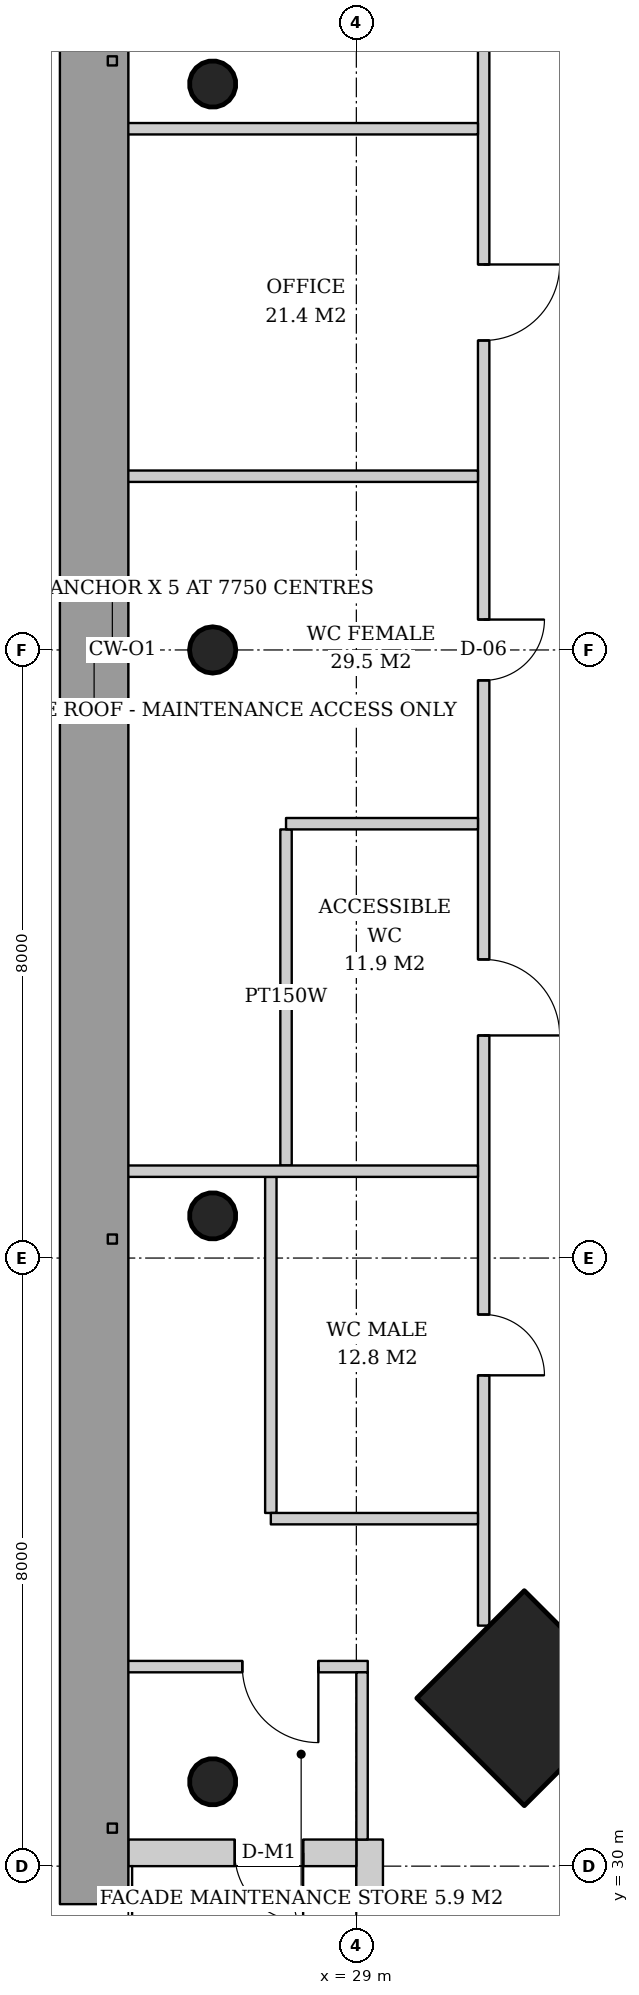
"""IFC4 building model, lengths in metres.
Left out: names, types, materials, properties, quantities, classifications, styles, units other than length and angle.
Written with IfcOpenShell. Run it as: python <this file> out.ifc"""

import sys

from ifc_helpers import new_model, si_unit, direction, frame, frame_2d, origin, origin_2d, place, context, subcontext, project, spatial, rectangle, hollow_circle, extrude, element, fill, save


model = new_model("IFC4")
c1 = context("Model", 3, precision=1e-05, world=origin(), true_north=direction((0.0, 1.0)))
c2 = subcontext(c1, "Body", "Model", "MODEL_VIEW")
j1 = project(units=[si_unit("LENGTHUNIT", "METRE"), si_unit("PLANEANGLEUNIT", "RADIAN")], contexts=[c1])
p1 = place(None, origin())
s1 = spatial("IfcSite", under=j1, at=p1, CompositionType="ELEMENT")
p2 = place(p1, origin())
s2 = spatial("IfcBuilding", under=s1, at=p2, CompositionType="ELEMENT")
p3 = place(p2, frame((0.0, 0.0, 211.0)))
s3 = spatial("IfcBuildingStorey", under=s2, at=p3, CompositionType="ELEMENT", Elevation=211.0)
p4 = place(p3, frame((31.171, 32.171, 0.0), z_axis=(0.031962158256, 0.031962158256, 0.998977898093), x_axis=(-0.707106781187, 0.707106781187, 0.0)))
e1 = element("IfcColumn", 1, at=p4, inside=s3, PredefinedType="COLUMN", context=c2, shape_type="SweptSolid", body=[
    extrude(rectangle(XDim=2.0, YDim=2.0, at=origin_2d()), origin(), (0.0, 0.0, 1.0), 3.804),
])
p5 = place(p3, frame((27.072, 31.072, 0.0), z_axis=(0.031898107953, 0.031898107953, 0.998981992539), x_axis=(-0.707106781187, 0.707106781187, 0.0)))
e2 = element("IfcColumn", 2, at=p5, inside=s3, PredefinedType="COLUMN", context=c2, shape_type="SweptSolid", body=[
    extrude(hollow_circle(Radius=0.305, WallThickness=0.025, at=origin_2d()), origin(), (0.0, 0.0, 1.0), 3.804),
])
p6 = place(p3, frame((27.072, 53.464, 0.0), z_axis=(0.031910269556, -0.015987237665, 0.999362868496), x_axis=(0.447933021895, 0.894067115991, 0.0)))
e3 = element("IfcColumn", 3, at=p6, inside=s3, PredefinedType="COLUMN", context=c2, shape_type="SweptSolid", body=[
    extrude(hollow_circle(Radius=0.305, WallThickness=0.025, at=origin_2d()), origin(), (0.0, 0.0, 1.0), 3.802),
])
p7 = place(p3, frame((27.072, 46.0, 0.0), z_axis=(0.031914348339, 0.0, 0.999490607445), x_axis=(0.0, 1.0, 0.0)))
e4 = element("IfcColumn", 4, at=p7, inside=s3, PredefinedType="COLUMN", context=c2, shape_type="SweptSolid", body=[
    extrude(hollow_circle(Radius=0.305, WallThickness=0.025, at=origin_2d()), origin(), (0.0, 0.0, 1.0), 3.802),
])
p8 = place(p3, frame((27.072, 38.536, 0.0), z_axis=(0.031910269556, 0.015987237665, 0.999362868496), x_axis=(-0.447933021895, 0.894067115991, 0.0)))
e5 = element("IfcColumn", 5, at=p8, inside=s3, PredefinedType="COLUMN", context=c2, shape_type="SweptSolid", body=[
    extrude(hollow_circle(Radius=0.305, WallThickness=0.025, at=origin_2d()), origin(), (0.0, 0.0, 1.0), 3.802),
])
p9 = place(p3, frame((29.175, 27.0, 0.0), z_axis=(0.0, 0.0, 1.0), x_axis=(0.0, 1.0, 0.0)))
e6 = element("IfcWall", 6, at=p9, inside=s3, PredefinedType="SOLIDWALL", context=c2, shape_type="SweptSolid", body=[
    extrude(rectangle(XDim=3.35, YDim=0.35, at=frame_2d((1.675, 0.0))), origin(), (0.0, 0.0, 1.0), 3.62),
])
p10 = place(p9, frame((1.6, 0.0, 0.0)))
e7 = element("IfcOpeningElement", 7, at=p10, cuts=e6, PredefinedType="OPENING", context=c2, shape_type="SweptSolid", body=[
    extrude(rectangle(XDim=1.0, YDim=2.4, at=frame_2d((0.5, 1.2))), frame((0.0, 0.185, 0.0), z_axis=(0.0, -1.0, 0.0), x_axis=(1.0, 0.0, 0.0)), (0.0, 0.0, 1.0), 0.37),
])
p11 = place(p3, frame((29.0, 30.175, 0.0), z_axis=(0.0, 0.0, 1.0), x_axis=(-1.0, 0.0, 0.0)))
e8 = element("IfcWall", 8, at=p11, inside=s3, PredefinedType="SOLIDWALL", context=c2, shape_type="SweptSolid", body=[
    extrude(rectangle(XDim=3.0, YDim=0.35, at=frame_2d((1.5, 0.0))), origin(), (0.0, 0.0, 1.0), 3.62),
])
p12 = place(p11, frame((0.7, 0.0, 0.0)))
e9 = element("IfcOpeningElement", 9, at=p12, cuts=e8, PredefinedType="OPENING", context=c2, shape_type="SweptSolid", body=[
    extrude(rectangle(XDim=0.9, YDim=2.1, at=frame_2d((0.45, 1.05))), frame((0.0, 0.185, 0.0), z_axis=(0.0, -1.0, 0.0), x_axis=(1.0, 0.0, 0.0)), (0.0, 0.0, 1.0), 0.37),
])
p13 = place(p3, frame((28.075, 43.639, 0.0), z_axis=(0.0, 0.0, 1.0), x_axis=(0.0, -1.0, 0.0)))
e10 = element("IfcWall", 10, at=p13, inside=s3, PredefinedType="PARTITIONING", context=c2, shape_type="SweptSolid", body=[
    extrude(rectangle(XDim=4.422, YDim=0.15, at=frame_2d((2.211, 0.0))), origin(), (0.0, 0.0, 1.0), 2.867),
])
p14 = place(p3, frame((27.875, 39.068, 0.0), z_axis=(0.0, 0.0, 1.0), x_axis=(0.0, -1.0, 0.0)))
e11 = element("IfcWall", 11, at=p14, inside=s3, PredefinedType="PARTITIONING", context=c2, shape_type="SweptSolid", body=[
    extrude(rectangle(XDim=4.421, YDim=0.15, at=frame_2d((2.211, 0.0))), origin(), (0.0, 0.0, 1.0), 2.867),
])
p15 = place(p3, frame((30.675, 58.836, 0.0), z_axis=(0.0, 0.0, 1.0), x_axis=(0.0, -1.0, 0.0)))
e12 = element("IfcWall", 12, at=p15, inside=s3, PredefinedType="PARTITIONING", context=c2, shape_type="SweptSolid", body=[
    extrude(rectangle(XDim=25.671, YDim=0.15, at=frame_2d((12.836, 0.0))), origin(), (0.0, 0.0, 1.0), 2.867),
])
p16 = place(p15, frame((3.193, 0.0, 0.0)))
e13 = element("IfcOpeningElement", 13, at=p16, cuts=e12, PredefinedType="OPENING", context=c2, shape_type="SweptSolid", body=[
    extrude(rectangle(XDim=1.0, YDim=2.1, at=frame_2d((0.5, 1.05))), frame((0.0, 0.085, 0.0), z_axis=(0.0, -1.0, 0.0), x_axis=(1.0, 0.0, 0.0)), (0.0, 0.0, 1.0), 0.17),
])
p17 = place(p15, frame((7.764, 0.0, 0.0)))
e14 = element("IfcOpeningElement", 14, at=p17, cuts=e12, PredefinedType="OPENING", context=c2, shape_type="SweptSolid", body=[
    extrude(rectangle(XDim=1.0, YDim=2.1, at=frame_2d((0.5, 1.05))), frame((0.0, 0.085, 0.0), z_axis=(0.0, -1.0, 0.0), x_axis=(1.0, 0.0, 0.0)), (0.0, 0.0, 1.0), 0.17),
])
p18 = place(p15, frame((12.436, 0.0, 0.0)))
e15 = element("IfcOpeningElement", 15, at=p18, cuts=e12, PredefinedType="OPENING", context=c2, shape_type="SweptSolid", body=[
    extrude(rectangle(XDim=0.8, YDim=2.1, at=frame_2d((0.4, 1.05))), frame((0.0, 0.085, 0.0), z_axis=(0.0, -1.0, 0.0), x_axis=(1.0, 0.0, 0.0)), (0.0, 0.0, 1.0), 0.17),
])
p19 = place(p15, frame((16.907, 0.0, 0.0)))
e16 = element("IfcOpeningElement", 16, at=p19, cuts=e12, PredefinedType="OPENING", context=c2, shape_type="SweptSolid", body=[
    extrude(rectangle(XDim=1.0, YDim=2.1, at=frame_2d((0.5, 1.05))), frame((0.0, 0.085, 0.0), z_axis=(0.0, -1.0, 0.0), x_axis=(1.0, 0.0, 0.0)), (0.0, 0.0, 1.0), 0.17),
])
p20 = place(p15, frame((21.579, 0.0, 0.0)))
e17 = element("IfcOpeningElement", 17, at=p20, cuts=e12, PredefinedType="OPENING", context=c2, shape_type="SweptSolid", body=[
    extrude(rectangle(XDim=0.8, YDim=2.1, at=frame_2d((0.4, 1.05))), frame((0.0, 0.085, 0.0), z_axis=(0.0, -1.0, 0.0), x_axis=(1.0, 0.0, 0.0)), (0.0, 0.0, 1.0), 0.17),
])
for number, where, z_axis, x_axis in (
    (18, (30.6, 52.857, 0.0), (0.0, 0.0, 1.0), (-1.0, 0.0, 0.0)),
    (19, (30.6, 48.286, 0.0), (0.0, 0.0, 1.0), (-1.0, 0.0, 0.0)),
):
    element("IfcWall", number, at=place(p3, frame(where, z_axis=z_axis, x_axis=x_axis)), inside=s3, PredefinedType="PARTITIONING", context=c2, shape_type="SweptSolid", body=[
        extrude(rectangle(XDim=4.64, YDim=0.15, at=frame_2d((2.32, 0.0))), origin(), (0.0, 0.0, 1.0), 3.12),
    ])
p21 = place(p3, frame((30.6, 43.714, 0.0), z_axis=(0.0, 0.0, 1.0), x_axis=(-1.0, 0.0, 0.0)))
e20 = element("IfcWall", 20, at=p21, inside=s3, PredefinedType="PARTITIONING", context=c2, shape_type="SweptSolid", body=[
    extrude(rectangle(XDim=2.525, YDim=0.15, at=frame_2d((1.263, 0.0))), origin(), (0.0, 0.0, 1.0), 2.867),
])
p22 = place(p3, frame((30.6, 39.143, 0.0), z_axis=(0.0, 0.0, 1.0), x_axis=(-1.0, 0.0, 0.0)))
e21 = element("IfcWall", 21, at=p22, inside=s3, PredefinedType="PARTITIONING", context=c2, shape_type="SweptSolid", body=[
    extrude(rectangle(XDim=4.64, YDim=0.15, at=frame_2d((2.32, 0.0))), origin(), (0.0, 0.0, 1.0), 3.12),
])
p23 = place(p3, frame((30.6, 34.572, 0.0), z_axis=(0.0, 0.0, 1.0), x_axis=(-1.0, 0.0, 0.0)))
e22 = element("IfcWall", 22, at=p23, inside=s3, PredefinedType="PARTITIONING", context=c2, shape_type="SweptSolid", body=[
    extrude(rectangle(XDim=2.725, YDim=0.15, at=frame_2d((1.363, 0.0))), origin(), (0.0, 0.0, 1.0), 3.62),
])
p24 = place(p3, frame((29.15, 32.625, 0.0), z_axis=(0.0, 0.0, 1.0), x_axis=(-1.0, 0.0, 0.0)))
e23 = element("IfcWall", 23, at=p24, inside=s3, PredefinedType="PARTITIONING", context=c2, shape_type="SweptSolid", body=[
    extrude(rectangle(XDim=3.19, YDim=0.15, at=frame_2d((1.595, 0.0))), origin(), (0.0, 0.0, 1.0), 3.12),
])
p25 = place(p24, frame((0.65, 0.0, 0.0)))
e24 = element("IfcOpeningElement", 24, at=p25, cuts=e23, PredefinedType="OPENING", context=c2, shape_type="SweptSolid", body=[
    extrude(rectangle(XDim=1.0, YDim=2.1, at=frame_2d((0.5, 1.05))), frame((0.0, 0.085, 0.0), z_axis=(0.0, -1.0, 0.0), x_axis=(1.0, 0.0, 0.0)), (0.0, 0.0, 1.0), 0.17),
])
p26 = place(p3, frame((29.075, 32.55, 0.0), z_axis=(0.0, 0.0, 1.0), x_axis=(0.0, -1.0, 0.0)))
e25 = element("IfcWall", 25, at=p26, inside=s3, PredefinedType="PARTITIONING", context=c2, shape_type="SweptSolid", body=[
    extrude(rectangle(XDim=2.2, YDim=0.15, at=frame_2d((1.1, 0.0))), origin(), (0.0, 0.0, 1.0), 3.02),
])
p27 = place(p12, origin())
e26 = element("IfcDoor", 26, at=p27, inside=s3, OperationType="SINGLE_SWING_LEFT", PredefinedType="DOOR", context=c2, shape_type="SweptSolid", body=[
    extrude(rectangle(XDim=0.9, YDim=2.1, at=frame_2d((0.45, 1.05))), frame((0.0, 0.025, 0.0), z_axis=(0.0, -1.0, 0.0), x_axis=(1.0, 0.0, 0.0)), (0.0, 0.0, 1.0), 0.05),
])
fill(e9, e26)
p28 = place(p10, origin())
e27 = element("IfcDoor", 27, at=p28, inside=s3, OperationType="SINGLE_SWING_RIGHT", PredefinedType="DOOR", context=c2, shape_type="SweptSolid", body=[
    extrude(rectangle(XDim=1.0, YDim=2.4, at=frame_2d((0.5, 1.2))), frame((0.0, 0.025, 0.0), z_axis=(0.0, -1.0, 0.0), x_axis=(1.0, 0.0, 0.0)), (0.0, 0.0, 1.0), 0.05),
])
fill(e7, e27)
p29 = place(p17, origin())
e28 = element("IfcDoor", 28, at=p29, inside=s3, OperationType="SINGLE_SWING_LEFT", PredefinedType="DOOR", context=c2, shape_type="SweptSolid", body=[
    extrude(rectangle(XDim=1.0, YDim=2.1, at=frame_2d((0.5, 1.05))), frame((0.0, 0.025, 0.0), z_axis=(0.0, -1.0, 0.0), x_axis=(1.0, 0.0, 0.0)), (0.0, 0.0, 1.0), 0.05),
])
fill(e14, e28)
p30 = place(p18, origin())
e29 = element("IfcDoor", 29, at=p30, inside=s3, OperationType="SINGLE_SWING_LEFT", PredefinedType="DOOR", context=c2, shape_type="SweptSolid", body=[
    extrude(rectangle(XDim=0.8, YDim=2.1, at=frame_2d((0.4, 1.05))), frame((0.0, 0.025, 0.0), z_axis=(0.0, -1.0, 0.0), x_axis=(1.0, 0.0, 0.0)), (0.0, 0.0, 1.0), 0.05),
])
fill(e15, e29)
p31 = place(p19, origin())
e30 = element("IfcDoor", 30, at=p31, inside=s3, OperationType="SINGLE_SWING_RIGHT", PredefinedType="DOOR", context=c2, shape_type="SweptSolid", body=[
    extrude(rectangle(XDim=1.0, YDim=2.1, at=frame_2d((0.5, 1.05))), frame((0.0, 0.025, 0.0), z_axis=(0.0, -1.0, 0.0), x_axis=(1.0, 0.0, 0.0)), (0.0, 0.0, 1.0), 0.05),
])
fill(e16, e30)
p32 = place(p20, origin())
e31 = element("IfcDoor", 31, at=p32, inside=s3, OperationType="SINGLE_SWING_RIGHT", PredefinedType="DOOR", context=c2, shape_type="SweptSolid", body=[
    extrude(rectangle(XDim=0.8, YDim=2.1, at=frame_2d((0.4, 1.05))), frame((0.0, 0.025, 0.0), z_axis=(0.0, -1.0, 0.0), x_axis=(1.0, 0.0, 0.0)), (0.0, 0.0, 1.0), 0.05),
])
fill(e17, e31)
p33 = place(p25, origin())
e32 = element("IfcDoor", 32, at=p33, inside=s3, OperationType="SINGLE_SWING_LEFT", PredefinedType="DOOR", context=c2, shape_type="SweptSolid", body=[
    extrude(rectangle(XDim=1.0, YDim=2.1, at=frame_2d((0.5, 1.05))), frame((0.0, 0.025, 0.0), z_axis=(0.0, -1.0, 0.0), x_axis=(1.0, 0.0, 0.0)), (0.0, 0.0, 1.0), 0.05),
])
fill(e24, e32)
save(model, sys.argv[1])
